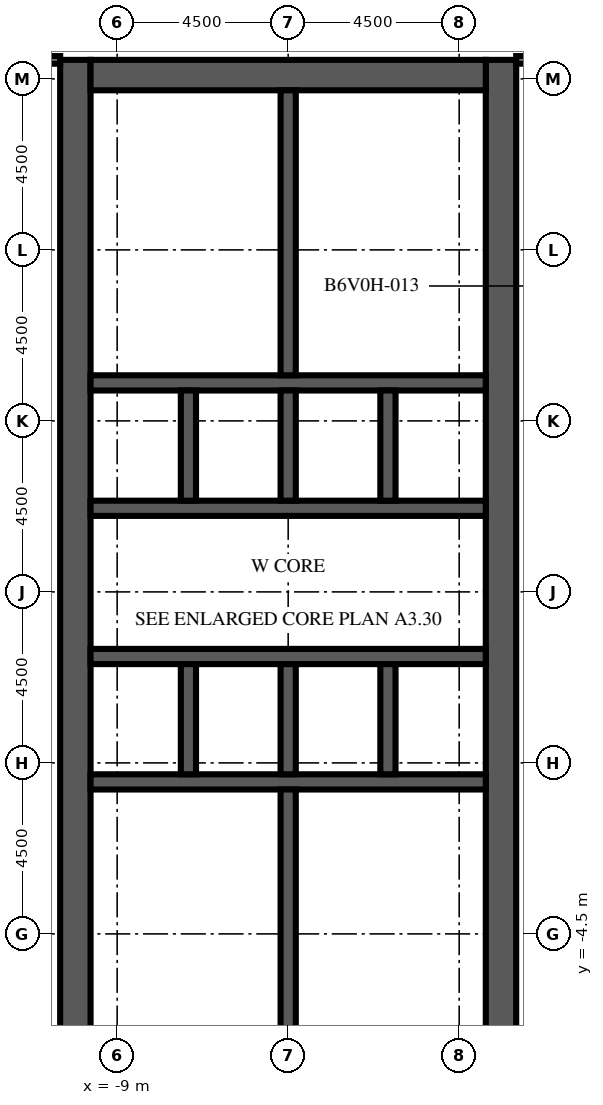
"""IFC4 building model, lengths in metres.
Left out: names, types, materials, properties, quantities, classifications, styles, units other than length and angle.
Written with IfcOpenShell. Run it as: python <this file> out.ifc"""

import sys

from ifc_helpers import new_model, si_unit, direction, frame, frame_2d, origin, place, context, subcontext, project, spatial, rectangle, extrude, element, fill, save


model = new_model("IFC4")
c1 = context("Model", 3, precision=1e-05, world=origin(), true_north=direction((0.0, 1.0)))
c2 = subcontext(c1, "Body", "Model", "MODEL_VIEW")
j1 = project(units=[si_unit("LENGTHUNIT", "METRE"), si_unit("PLANEANGLEUNIT", "RADIAN")], contexts=[c1])
p1 = place(None, origin())
s1 = spatial("IfcSite", under=j1, at=p1, CompositionType="ELEMENT")
p2 = place(p1, origin())
s2 = spatial("IfcBuilding", under=s1, at=p2, CompositionType="ELEMENT")
p3 = place(p2, frame((0.0, 0.0, 191.5)))
s3 = spatial("IfcBuildingStorey", under=s2, at=p3, CompositionType="ELEMENT", Elevation=191.5)
p4 = place(p3, frame((-10.1, -9.0, 0.0), z_axis=(0.0, 0.0, 1.0), x_axis=(0.0, 1.0, 0.0)))
e1 = element("IfcWall", 1, at=p4, inside=s3, PredefinedType="SHEAR", context=c2, shape_type="SweptSolid", body=[
    extrude(rectangle(XDim=27.5, YDim=0.8, at=frame_2d((13.75, 0.0))), origin(), (0.0, 0.0, 1.0), 4.1),
])
p5 = place(p4, frame((12.55, 0.0, 0.0)))
e2 = element("IfcOpeningElement", 2, at=p5, cuts=e1, PredefinedType="OPENING", context=c2, shape_type="SweptSolid", body=[
    extrude(rectangle(XDim=2.4, YDim=2.4, at=frame_2d((1.2, 1.2))), frame((0.0, 0.41, 0.0), z_axis=(0.0, -1.0, 0.0), x_axis=(1.0, 0.0, 0.0)), (0.0, 0.0, 1.0), 0.82),
])
p6 = place(p4, frame((6.825, 0.0, 0.0)))
e3 = element("IfcOpeningElement", 3, at=p6, cuts=e1, PredefinedType="OPENING", context=c2, shape_type="SweptSolid", body=[
    extrude(rectangle(XDim=1.2, YDim=2.1, at=frame_2d((0.6, 1.05))), frame((0.0, 0.41, 0.0), z_axis=(0.0, -1.0, 0.0), x_axis=(1.0, 0.0, 0.0)), (0.0, 0.0, 1.0), 0.82),
])
p7 = place(p4, frame((19.475, 0.0, 0.0)))
e4 = element("IfcOpeningElement", 4, at=p7, cuts=e1, PredefinedType="OPENING", context=c2, shape_type="SweptSolid", body=[
    extrude(rectangle(XDim=1.2, YDim=2.1, at=frame_2d((0.6, 1.05))), frame((0.0, 0.41, 0.0), z_axis=(0.0, -1.0, 0.0), x_axis=(1.0, 0.0, 0.0)), (0.0, 0.0, 1.0), 0.82),
])
p8 = place(p3, frame((1.1, -9.0, 0.0), z_axis=(0.0, 0.0, 1.0), x_axis=(0.0, 1.0, 0.0)))
e5 = element("IfcWall", 5, at=p8, inside=s3, PredefinedType="SHEAR", context=c2, shape_type="SweptSolid", body=[
    extrude(rectangle(XDim=27.5, YDim=0.8, at=frame_2d((13.75, 0.0))), origin(), (0.0, 0.0, 1.0), 4.1),
])
p9 = place(p8, frame((12.55, 0.0, 0.0)))
e6 = element("IfcOpeningElement", 6, at=p9, cuts=e5, PredefinedType="OPENING", context=c2, shape_type="SweptSolid", body=[
    extrude(rectangle(XDim=2.4, YDim=2.4, at=frame_2d((1.2, 1.2))), frame((0.0, 0.41, 0.0), z_axis=(0.0, -1.0, 0.0), x_axis=(1.0, 0.0, 0.0)), (0.0, 0.0, 1.0), 0.82),
])
p10 = place(p8, frame((3.95, 0.0, 0.0)))
e7 = element("IfcOpeningElement", 7, at=p10, cuts=e5, PredefinedType="OPENING", context=c2, shape_type="SweptSolid", body=[
    extrude(rectangle(XDim=1.2, YDim=2.1, at=frame_2d((0.6, 1.05))), frame((0.0, 0.41, 0.0), z_axis=(0.0, -1.0, 0.0), x_axis=(1.0, 0.0, 0.0)), (0.0, 0.0, 1.0), 0.82),
])
p11 = place(p8, frame((19.45, 0.0, 0.0)))
e8 = element("IfcOpeningElement", 8, at=p11, cuts=e5, PredefinedType="OPENING", context=c2, shape_type="SweptSolid", body=[
    extrude(rectangle(XDim=1.0, YDim=2.1, at=frame_2d((0.5, 1.05))), frame((0.0, 0.41, 0.0), z_axis=(0.0, -1.0, 0.0), x_axis=(1.0, 0.0, 0.0)), (0.0, 0.0, 1.0), 0.82),
])
p12 = place(p8, frame((21.137, 0.0, 0.0)))
e9 = element("IfcOpeningElement", 9, at=p12, cuts=e5, PredefinedType="OPENING", context=c2, shape_type="SweptSolid", body=[
    extrude(rectangle(XDim=1.0, YDim=2.1, at=frame_2d((0.5, 1.05))), frame((0.0, 0.41, 0.0), z_axis=(0.0, -1.0, 0.0), x_axis=(1.0, 0.0, 0.0)), (0.0, 0.0, 1.0), 0.82),
])
p13 = place(p8, frame((23.2, 0.0, 0.0)))
e10 = element("IfcOpeningElement", 10, at=p13, cuts=e5, PredefinedType="OPENING", context=c2, shape_type="SweptSolid", body=[
    extrude(rectangle(XDim=1.0, YDim=2.1, at=frame_2d((0.5, 1.05))), frame((0.0, 0.41, 0.0), z_axis=(0.0, -1.0, 0.0), x_axis=(1.0, 0.0, 0.0)), (0.0, 0.0, 1.0), 0.82),
])
p14 = place(p8, frame((25.262, 0.0, 0.0)))
e11 = element("IfcOpeningElement", 11, at=p14, cuts=e5, PredefinedType="OPENING", context=c2, shape_type="SweptSolid", body=[
    extrude(rectangle(XDim=1.0, YDim=2.1, at=frame_2d((0.5, 1.05))), frame((0.0, 0.41, 0.0), z_axis=(0.0, -1.0, 0.0), x_axis=(1.0, 0.0, 0.0)), (0.0, 0.0, 1.0), 0.82),
])
p15 = place(p3, frame((-9.7, 18.1, 0.0), z_axis=(0.0, 0.0, 1.0), x_axis=(1.0, 0.0, 0.0)))
e12 = element("IfcWall", 12, at=p15, inside=s3, PredefinedType="SHEAR", context=c2, shape_type="SweptSolid", body=[
    extrude(rectangle(XDim=10.4, YDim=0.8, at=frame_2d((5.2, 0.0))), origin(), (0.0, 0.0, 1.0), 4.1),
])
p16 = place(p3, frame((-9.7, -0.5, 0.0), z_axis=(0.0, 0.0, 1.0), x_axis=(1.0, 0.0, 0.0)))
e13 = element("IfcWall", 13, at=p16, inside=s3, PredefinedType="SHEAR", context=c2, shape_type="SweptSolid", body=[
    extrude(rectangle(XDim=10.4, YDim=0.4, at=frame_2d((5.2, 0.0))), origin(), (0.0, 0.0, 1.0), 4.1),
])
p17 = place(p3, frame((-9.7, 2.8, 0.0), z_axis=(0.0, 0.0, 1.0), x_axis=(1.0, 0.0, 0.0)))
e14 = element("IfcWall", 14, at=p17, inside=s3, PredefinedType="SHEAR", context=c2, shape_type="SweptSolid", body=[
    extrude(rectangle(XDim=10.4, YDim=0.4, at=frame_2d((5.2, 0.0))), origin(), (0.0, 0.0, 1.0), 4.1),
])
p18 = place(p17, frame((0.738, 0.0, 0.0)))
e15 = element("IfcOpeningElement", 15, at=p18, cuts=e14, PredefinedType="OPENING", context=c2, shape_type="SweptSolid", body=[
    extrude(rectangle(XDim=1.1, YDim=2.1, at=frame_2d((0.55, 1.05))), frame((0.0, 0.21, 0.0), z_axis=(0.0, -1.0, 0.0), x_axis=(1.0, 0.0, 0.0)), (0.0, 0.0, 1.0), 0.42),
])
p19 = place(p17, frame((3.337, 0.0, 0.0)))
e16 = element("IfcOpeningElement", 16, at=p19, cuts=e14, PredefinedType="OPENING", context=c2, shape_type="SweptSolid", body=[
    extrude(rectangle(XDim=1.1, YDim=2.1, at=frame_2d((0.55, 1.05))), frame((0.0, 0.21, 0.0), z_axis=(0.0, -1.0, 0.0), x_axis=(1.0, 0.0, 0.0)), (0.0, 0.0, 1.0), 0.42),
])
p20 = place(p17, frame((6.012, 0.0, 0.0)))
e17 = element("IfcOpeningElement", 17, at=p20, cuts=e14, PredefinedType="OPENING", context=c2, shape_type="SweptSolid", body=[
    extrude(rectangle(XDim=1.0, YDim=2.1, at=frame_2d((0.5, 1.05))), frame((0.0, 0.21, 0.0), z_axis=(0.0, -1.0, 0.0), x_axis=(1.0, 0.0, 0.0)), (0.0, 0.0, 1.0), 0.42),
])
p21 = place(p17, frame((8.613, 0.0, 0.0)))
e18 = element("IfcOpeningElement", 18, at=p21, cuts=e14, PredefinedType="OPENING", context=c2, shape_type="SweptSolid", body=[
    extrude(rectangle(XDim=1.0, YDim=2.1, at=frame_2d((0.5, 1.05))), frame((0.0, 0.21, 0.0), z_axis=(0.0, -1.0, 0.0), x_axis=(1.0, 0.0, 0.0)), (0.0, 0.0, 1.0), 0.42),
])
p22 = place(p3, frame((-9.7, 6.7, 0.0), z_axis=(0.0, 0.0, 1.0), x_axis=(1.0, 0.0, 0.0)))
e19 = element("IfcWall", 19, at=p22, inside=s3, PredefinedType="SHEAR", context=c2, shape_type="SweptSolid", body=[
    extrude(rectangle(XDim=10.4, YDim=0.4, at=frame_2d((5.2, 0.0))), origin(), (0.0, 0.0, 1.0), 4.1),
])
p23 = place(p22, frame((3.337, 0.0, 0.0)))
e20 = element("IfcOpeningElement", 20, at=p23, cuts=e19, PredefinedType="OPENING", context=c2, shape_type="SweptSolid", body=[
    extrude(rectangle(XDim=1.1, YDim=2.1, at=frame_2d((0.55, 1.05))), frame((0.0, 0.21, 0.0), z_axis=(0.0, -1.0, 0.0), x_axis=(1.0, 0.0, 0.0)), (0.0, 0.0, 1.0), 0.42),
])
p24 = place(p22, frame((5.962, 0.0, 0.0)))
e21 = element("IfcOpeningElement", 21, at=p24, cuts=e19, PredefinedType="OPENING", context=c2, shape_type="SweptSolid", body=[
    extrude(rectangle(XDim=1.1, YDim=2.1, at=frame_2d((0.55, 1.05))), frame((0.0, 0.21, 0.0), z_axis=(0.0, -1.0, 0.0), x_axis=(1.0, 0.0, 0.0)), (0.0, 0.0, 1.0), 0.42),
])
p25 = place(p22, frame((8.663, 0.0, 0.0)))
e22 = element("IfcOpeningElement", 22, at=p25, cuts=e19, PredefinedType="OPENING", context=c2, shape_type="SweptSolid", body=[
    extrude(rectangle(XDim=1.1, YDim=2.1, at=frame_2d((0.55, 1.05))), frame((0.0, 0.21, 0.0), z_axis=(0.0, -1.0, 0.0), x_axis=(1.0, 0.0, 0.0)), (0.0, 0.0, 1.0), 0.42),
])
p26 = place(p22, frame((0.688, 0.0, 0.0)))
e23 = element("IfcOpeningElement", 23, at=p26, cuts=e19, PredefinedType="OPENING", context=c2, shape_type="SweptSolid", body=[
    extrude(rectangle(XDim=1.0, YDim=2.1, at=frame_2d((0.5, 1.05))), frame((0.0, 0.21, 0.0), z_axis=(0.0, -1.0, 0.0), x_axis=(1.0, 0.0, 0.0)), (0.0, 0.0, 1.0), 0.42),
])
p27 = place(p3, frame((-9.7, 10.0, 0.0), z_axis=(0.0, 0.0, 1.0), x_axis=(1.0, 0.0, 0.0)))
e24 = element("IfcWall", 24, at=p27, inside=s3, PredefinedType="SHEAR", context=c2, shape_type="SweptSolid", body=[
    extrude(rectangle(XDim=10.4, YDim=0.4, at=frame_2d((5.2, 0.0))), origin(), (0.0, 0.0, 1.0), 4.1),
])
for number, where, z_axis, x_axis in (
    (25, (-7.125, -0.3, 0.0), (0.0, 0.0, 1.0), (0.0, 1.0, 0.0)),
    (26, (-7.125, 6.9, 0.0), (0.0, 0.0, 1.0), (0.0, 1.0, 0.0)),
    (27, (-4.5, -0.3, 0.0), (0.0, 0.0, 1.0), (0.0, 1.0, 0.0)),
    (28, (-4.5, 6.9, 0.0), (0.0, 0.0, 1.0), (0.0, 1.0, 0.0)),
    (29, (-1.875, -0.3, 0.0), (0.0, 0.0, 1.0), (0.0, 1.0, 0.0)),
    (30, (-1.875, 6.9, 0.0), (0.0, 0.0, 1.0), (0.0, 1.0, 0.0)),
):
    element("IfcWall", number, at=place(p3, frame(where, z_axis=z_axis, x_axis=x_axis)), inside=s3, PredefinedType="SHEAR", context=c2, shape_type="SweptSolid", body=[
        extrude(rectangle(XDim=2.9, YDim=0.4, at=frame_2d((1.45, 0.0))), origin(), (0.0, 0.0, 1.0), 4.1),
    ])
for number, where, z_axis, x_axis in (
    (31, (-4.5, -8.2, 0.0), (0.0, 0.0, 1.0), (0.0, 1.0, 0.0)),
    (32, (-4.5, 10.2, 0.0), (0.0, 0.0, 1.0), (0.0, 1.0, 0.0)),
):
    element("IfcWall", number, at=place(p3, frame(where, z_axis=z_axis, x_axis=x_axis)), inside=s3, PredefinedType="SHEAR", context=c2, shape_type="SweptSolid", body=[
        extrude(rectangle(XDim=7.5, YDim=0.4, at=frame_2d((3.75, 0.0))), origin(), (0.0, 0.0, 1.0), 4.1),
    ])
p28 = place(p3, frame((-0.9, -5.95, 0.0), z_axis=(0.0, 0.0, 1.0), x_axis=(1.0, 0.0, 0.0)))
e33 = element("IfcWall", 33, at=p28, inside=s3, PredefinedType="PARTITIONING", context=c2, shape_type="SweptSolid", body=[
    extrude(rectangle(XDim=1.6, YDim=0.1, at=frame_2d((0.8, 0.0))), origin(), (0.0, 0.0, 1.0), 3.65),
])
p29 = place(p28, frame((0.3, 0.0, 0.0)))
e34 = element("IfcOpeningElement", 34, at=p29, cuts=e33, PredefinedType="OPENING", context=c2, shape_type="SweptSolid", body=[
    extrude(rectangle(XDim=1.0, YDim=2.1, at=frame_2d((0.5, 1.05))), frame((0.0, 0.06, 0.0), z_axis=(0.0, -1.0, 0.0), x_axis=(1.0, 0.0, 0.0)), (0.0, 0.0, 1.0), 0.12),
])
p30 = place(p3, frame((-0.9, -2.95, 0.0), z_axis=(0.0, 0.0, 1.0), x_axis=(1.0, 0.0, 0.0)))
e35 = element("IfcWall", 35, at=p30, inside=s3, PredefinedType="PARTITIONING", context=c2, shape_type="SweptSolid", body=[
    extrude(rectangle(XDim=1.6, YDim=0.1, at=frame_2d((0.8, 0.0))), origin(), (0.0, 0.0, 1.0), 3.65),
])
p31 = place(p30, frame((0.3, 0.0, 0.0)))
e36 = element("IfcOpeningElement", 36, at=p31, cuts=e35, PredefinedType="OPENING", context=c2, shape_type="SweptSolid", body=[
    extrude(rectangle(XDim=1.0, YDim=2.1, at=frame_2d((0.5, 1.05))), frame((0.0, 0.06, 0.0), z_axis=(0.0, -1.0, 0.0), x_axis=(1.0, 0.0, 0.0)), (0.0, 0.0, 1.0), 0.12),
])
p32 = place(p3, frame((-0.9, -5.95, 0.0), z_axis=(0.0, 0.0, 1.0), x_axis=(0.0, 1.0, 0.0)))
e37 = element("IfcWall", 37, at=p32, inside=s3, PredefinedType="PARTITIONING", context=c2, shape_type="SweptSolid", body=[
    extrude(rectangle(XDim=3.0, YDim=0.1, at=frame_2d((1.5, 0.0))), origin(), (0.0, 0.0, 1.0), 3.65),
])
p33 = place(p32, frame((1.0, 0.0, 0.0)))
e38 = element("IfcOpeningElement", 38, at=p33, cuts=e37, PredefinedType="OPENING", context=c2, shape_type="SweptSolid", body=[
    extrude(rectangle(XDim=1.0, YDim=2.1, at=frame_2d((0.5, 1.05))), frame((0.0, 0.06, 0.0), z_axis=(0.0, -1.0, 0.0), x_axis=(1.0, 0.0, 0.0)), (0.0, 0.0, 1.0), 0.12),
])
for number, where, z_axis, x_axis in (
    (39, (-4.3, -5.95, 0.0), (0.0, 0.0, 1.0), (1.0, 0.0, 0.0)),
    (40, (-4.3, -2.95, 0.0), (0.0, 0.0, 1.0), (1.0, 0.0, 0.0)),
):
    element("IfcWall", number, at=place(p3, frame(where, z_axis=z_axis, x_axis=x_axis)), inside=s3, PredefinedType="PARTITIONING", context=c2, shape_type="SweptSolid", body=[
        extrude(rectangle(XDim=3.4, YDim=0.1, at=frame_2d((1.7, 0.0))), origin(), (0.0, 0.0, 1.0), 3.65),
    ])
for number, where, z_axis, x_axis in (
    (41, (-4.3, 11.7, 0.0), (0.0, 0.0, 1.0), (1.0, 0.0, 0.0)),
    (42, (-4.3, 13.575, 0.0), (0.0, 0.0, 1.0), (1.0, 0.0, 0.0)),
    (43, (-4.3, 15.825, 0.0), (0.0, 0.0, 1.0), (1.0, 0.0, 0.0)),
):
    element("IfcWall", number, at=place(p3, frame(where, z_axis=z_axis, x_axis=x_axis)), inside=s3, PredefinedType="PARTITIONING", context=c2, shape_type="SweptSolid", body=[
        extrude(rectangle(XDim=5.0, YDim=0.1, at=frame_2d((2.5, 0.0))), origin(), (0.0, 0.0, 1.0), 3.65),
    ])
p34 = place(p3, frame((-13.5, 18.5, 0.0), z_axis=(0.0, 0.0, 1.0), x_axis=(1.0, 0.0, 0.0)))
e44 = element("IfcWall", 44, at=p34, inside=s3, PredefinedType="PARTITIONING", context=c2, shape_type="SweptSolid", body=[
    extrude(rectangle(XDim=3.0, YDim=0.2, at=frame_2d((1.5, 0.0))), origin(), (0.0, 0.0, 1.0), 3.65),
])
p35 = place(p34, frame((1.35, 0.0, 0.0)))
e45 = element("IfcOpeningElement", 45, at=p35, cuts=e44, PredefinedType="OPENING", context=c2, shape_type="SweptSolid", body=[
    extrude(rectangle(XDim=1.0, YDim=2.1, at=frame_2d((0.5, 1.05))), frame((0.0, 0.11, 0.0), z_axis=(0.0, -1.0, 0.0), x_axis=(1.0, 0.0, 0.0)), (0.0, 0.0, 1.0), 0.22),
])
p36 = place(p3, frame((1.5, 18.5, 0.0), z_axis=(0.0, 0.0, 1.0), x_axis=(1.0, 0.0, 0.0)))
e46 = element("IfcWall", 46, at=p36, inside=s3, PredefinedType="PARTITIONING", context=c2, shape_type="SweptSolid", body=[
    extrude(rectangle(XDim=4.5, YDim=0.2, at=frame_2d((2.25, 0.0))), origin(), (0.0, 0.0, 1.0), 3.65),
])
p37 = place(p18, origin())
e47 = element("IfcDoor", 47, at=p37, inside=s3, OperationType="DOUBLE_DOOR_SLIDING", PredefinedType="DOOR", context=c2, shape_type="SweptSolid", body=[
    extrude(rectangle(XDim=1.1, YDim=2.1, at=frame_2d((0.55, 1.05))), frame((0.0, 0.025, 0.0), z_axis=(0.0, -1.0, 0.0), x_axis=(1.0, 0.0, 0.0)), (0.0, 0.0, 1.0), 0.05),
])
fill(e15, e47)
p38 = place(p19, origin())
e48 = element("IfcDoor", 48, at=p38, inside=s3, OperationType="DOUBLE_DOOR_SLIDING", PredefinedType="DOOR", context=c2, shape_type="SweptSolid", body=[
    extrude(rectangle(XDim=1.1, YDim=2.1, at=frame_2d((0.55, 1.05))), frame((0.0, 0.025, 0.0), z_axis=(0.0, -1.0, 0.0), x_axis=(1.0, 0.0, 0.0)), (0.0, 0.0, 1.0), 0.05),
])
fill(e16, e48)
p39 = place(p23, origin())
e49 = element("IfcDoor", 49, at=p39, inside=s3, OperationType="DOUBLE_DOOR_SLIDING", PredefinedType="DOOR", context=c2, shape_type="SweptSolid", body=[
    extrude(rectangle(XDim=1.1, YDim=2.1, at=frame_2d((0.55, 1.05))), frame((0.0, 0.025, 0.0), z_axis=(0.0, -1.0, 0.0), x_axis=(1.0, 0.0, 0.0)), (0.0, 0.0, 1.0), 0.05),
])
fill(e20, e49)
p40 = place(p24, origin())
e50 = element("IfcDoor", 50, at=p40, inside=s3, OperationType="DOUBLE_DOOR_SLIDING", PredefinedType="DOOR", context=c2, shape_type="SweptSolid", body=[
    extrude(rectangle(XDim=1.1, YDim=2.1, at=frame_2d((0.55, 1.05))), frame((0.0, 0.025, 0.0), z_axis=(0.0, -1.0, 0.0), x_axis=(1.0, 0.0, 0.0)), (0.0, 0.0, 1.0), 0.05),
])
fill(e21, e50)
p41 = place(p25, origin())
e51 = element("IfcDoor", 51, at=p41, inside=s3, OperationType="DOUBLE_DOOR_SLIDING", PredefinedType="DOOR", context=c2, shape_type="SweptSolid", body=[
    extrude(rectangle(XDim=1.1, YDim=2.1, at=frame_2d((0.55, 1.05))), frame((0.0, 0.025, 0.0), z_axis=(0.0, -1.0, 0.0), x_axis=(1.0, 0.0, 0.0)), (0.0, 0.0, 1.0), 0.05),
])
fill(e22, e51)
p42 = place(p5, origin())
e52 = element("IfcDoor", 52, at=p42, inside=s3, OperationType="DOUBLE_DOOR_DOUBLE_SWING", PredefinedType="DOOR", context=c2, shape_type="SweptSolid", body=[
    extrude(rectangle(XDim=2.4, YDim=2.4, at=frame_2d((1.2, 1.2))), frame((0.0, 0.025, 0.0), z_axis=(0.0, -1.0, 0.0), x_axis=(1.0, 0.0, 0.0)), (0.0, 0.0, 1.0), 0.05),
])
fill(e2, e52)
p43 = place(p9, origin())
e53 = element("IfcDoor", 53, at=p43, inside=s3, OperationType="DOUBLE_DOOR_DOUBLE_SWING", PredefinedType="DOOR", context=c2, shape_type="SweptSolid", body=[
    extrude(rectangle(XDim=2.4, YDim=2.4, at=frame_2d((1.2, 1.2))), frame((0.0, 0.025, 0.0), z_axis=(0.0, -1.0, 0.0), x_axis=(1.0, 0.0, 0.0)), (0.0, 0.0, 1.0), 0.05),
])
fill(e6, e53)
p44 = place(p6, origin())
e54 = element("IfcDoor", 54, at=p44, inside=s3, OperationType="SINGLE_SWING_LEFT", PredefinedType="DOOR", context=c2, shape_type="SweptSolid", body=[
    extrude(rectangle(XDim=1.2, YDim=2.1, at=frame_2d((0.6, 1.05))), frame((0.0, 0.025, 0.0), z_axis=(0.0, -1.0, 0.0), x_axis=(1.0, 0.0, 0.0)), (0.0, 0.0, 1.0), 0.05),
])
fill(e3, e54)
p45 = place(p7, origin())
e55 = element("IfcDoor", 55, at=p45, inside=s3, OperationType="SINGLE_SWING_LEFT", PredefinedType="DOOR", context=c2, shape_type="SweptSolid", body=[
    extrude(rectangle(XDim=1.2, YDim=2.1, at=frame_2d((0.6, 1.05))), frame((0.0, 0.025, 0.0), z_axis=(0.0, -1.0, 0.0), x_axis=(1.0, 0.0, 0.0)), (0.0, 0.0, 1.0), 0.05),
])
fill(e4, e55)
p46 = place(p20, origin())
e56 = element("IfcDoor", 56, at=p46, inside=s3, OperationType="SINGLE_SWING_LEFT", PredefinedType="DOOR", context=c2, shape_type="SweptSolid", body=[
    extrude(rectangle(XDim=1.0, YDim=2.1, at=frame_2d((0.5, 1.05))), frame((0.0, 0.025, 0.0), z_axis=(0.0, -1.0, 0.0), x_axis=(1.0, 0.0, 0.0)), (0.0, 0.0, 1.0), 0.05),
])
fill(e17, e56)
p47 = place(p21, origin())
e57 = element("IfcDoor", 57, at=p47, inside=s3, OperationType="SINGLE_SWING_RIGHT", PredefinedType="DOOR", context=c2, shape_type="SweptSolid", body=[
    extrude(rectangle(XDim=1.0, YDim=2.1, at=frame_2d((0.5, 1.05))), frame((0.0, 0.025, 0.0), z_axis=(0.0, -1.0, 0.0), x_axis=(1.0, 0.0, 0.0)), (0.0, 0.0, 1.0), 0.05),
])
fill(e18, e57)
p48 = place(p26, origin())
e58 = element("IfcDoor", 58, at=p48, inside=s3, OperationType="SINGLE_SWING_LEFT", PredefinedType="DOOR", context=c2, shape_type="SweptSolid", body=[
    extrude(rectangle(XDim=1.0, YDim=2.1, at=frame_2d((0.5, 1.05))), frame((0.0, 0.025, 0.0), z_axis=(0.0, -1.0, 0.0), x_axis=(1.0, 0.0, 0.0)), (0.0, 0.0, 1.0), 0.05),
])
fill(e23, e58)
p49 = place(p10, origin())
e59 = element("IfcDoor", 59, at=p49, inside=s3, OperationType="SINGLE_SWING_LEFT", PredefinedType="DOOR", context=c2, shape_type="SweptSolid", body=[
    extrude(rectangle(XDim=1.2, YDim=2.1, at=frame_2d((0.6, 1.05))), frame((0.0, 0.375, 0.0), z_axis=(0.0, -1.0, 0.0), x_axis=(1.0, 0.0, 0.0)), (0.0, 0.0, 1.0), 0.05),
])
fill(e7, e59)
p50 = place(p29, origin())
e60 = element("IfcDoor", 60, at=p50, inside=s3, OperationType="SINGLE_SWING_RIGHT", PredefinedType="DOOR", context=c2, shape_type="SweptSolid", body=[
    extrude(rectangle(XDim=1.0, YDim=2.1, at=frame_2d((0.5, 1.05))), frame((0.0, 0.025, 0.0), z_axis=(0.0, -1.0, 0.0), x_axis=(1.0, 0.0, 0.0)), (0.0, 0.0, 1.0), 0.05),
])
fill(e34, e60)
p51 = place(p31, origin())
e61 = element("IfcDoor", 61, at=p51, inside=s3, OperationType="SINGLE_SWING_LEFT", PredefinedType="DOOR", context=c2, shape_type="SweptSolid", body=[
    extrude(rectangle(XDim=1.0, YDim=2.1, at=frame_2d((0.5, 1.05))), frame((0.0, 0.025, 0.0), z_axis=(0.0, -1.0, 0.0), x_axis=(1.0, 0.0, 0.0)), (0.0, 0.0, 1.0), 0.05),
])
fill(e36, e61)
p52 = place(p33, origin())
e62 = element("IfcDoor", 62, at=p52, inside=s3, OperationType="SINGLE_SWING_RIGHT", PredefinedType="DOOR", context=c2, shape_type="SweptSolid", body=[
    extrude(rectangle(XDim=1.0, YDim=2.1, at=frame_2d((0.5, 1.05))), frame((0.0, 0.025, 0.0), z_axis=(0.0, -1.0, 0.0), x_axis=(1.0, 0.0, 0.0)), (0.0, 0.0, 1.0), 0.05),
])
fill(e38, e62)
p53 = place(p11, origin())
e63 = element("IfcDoor", 63, at=p53, inside=s3, OperationType="SINGLE_SWING_LEFT", PredefinedType="DOOR", context=c2, shape_type="SweptSolid", body=[
    extrude(rectangle(XDim=1.0, YDim=2.1, at=frame_2d((0.5, 1.05))), frame((0.0, 0.375, 0.0), z_axis=(0.0, -1.0, 0.0), x_axis=(1.0, 0.0, 0.0)), (0.0, 0.0, 1.0), 0.05),
])
fill(e8, e63)
p54 = place(p12, origin())
e64 = element("IfcDoor", 64, at=p54, inside=s3, OperationType="SINGLE_SWING_RIGHT", PredefinedType="DOOR", context=c2, shape_type="SweptSolid", body=[
    extrude(rectangle(XDim=1.0, YDim=2.1, at=frame_2d((0.5, 1.05))), frame((0.0, 0.375, 0.0), z_axis=(0.0, -1.0, 0.0), x_axis=(1.0, 0.0, 0.0)), (0.0, 0.0, 1.0), 0.05),
])
fill(e9, e64)
p55 = place(p13, origin())
e65 = element("IfcDoor", 65, at=p55, inside=s3, OperationType="SINGLE_SWING_LEFT", PredefinedType="DOOR", context=c2, shape_type="SweptSolid", body=[
    extrude(rectangle(XDim=1.0, YDim=2.1, at=frame_2d((0.5, 1.05))), frame((0.0, 0.375, 0.0), z_axis=(0.0, -1.0, 0.0), x_axis=(1.0, 0.0, 0.0)), (0.0, 0.0, 1.0), 0.05),
])
fill(e10, e65)
p56 = place(p14, origin())
e66 = element("IfcDoor", 66, at=p56, inside=s3, OperationType="SINGLE_SWING_RIGHT", PredefinedType="DOOR", context=c2, shape_type="SweptSolid", body=[
    extrude(rectangle(XDim=1.0, YDim=2.1, at=frame_2d((0.5, 1.05))), frame((0.0, 0.375, 0.0), z_axis=(0.0, -1.0, 0.0), x_axis=(1.0, 0.0, 0.0)), (0.0, 0.0, 1.0), 0.05),
])
fill(e11, e66)
save(model, sys.argv[1])
